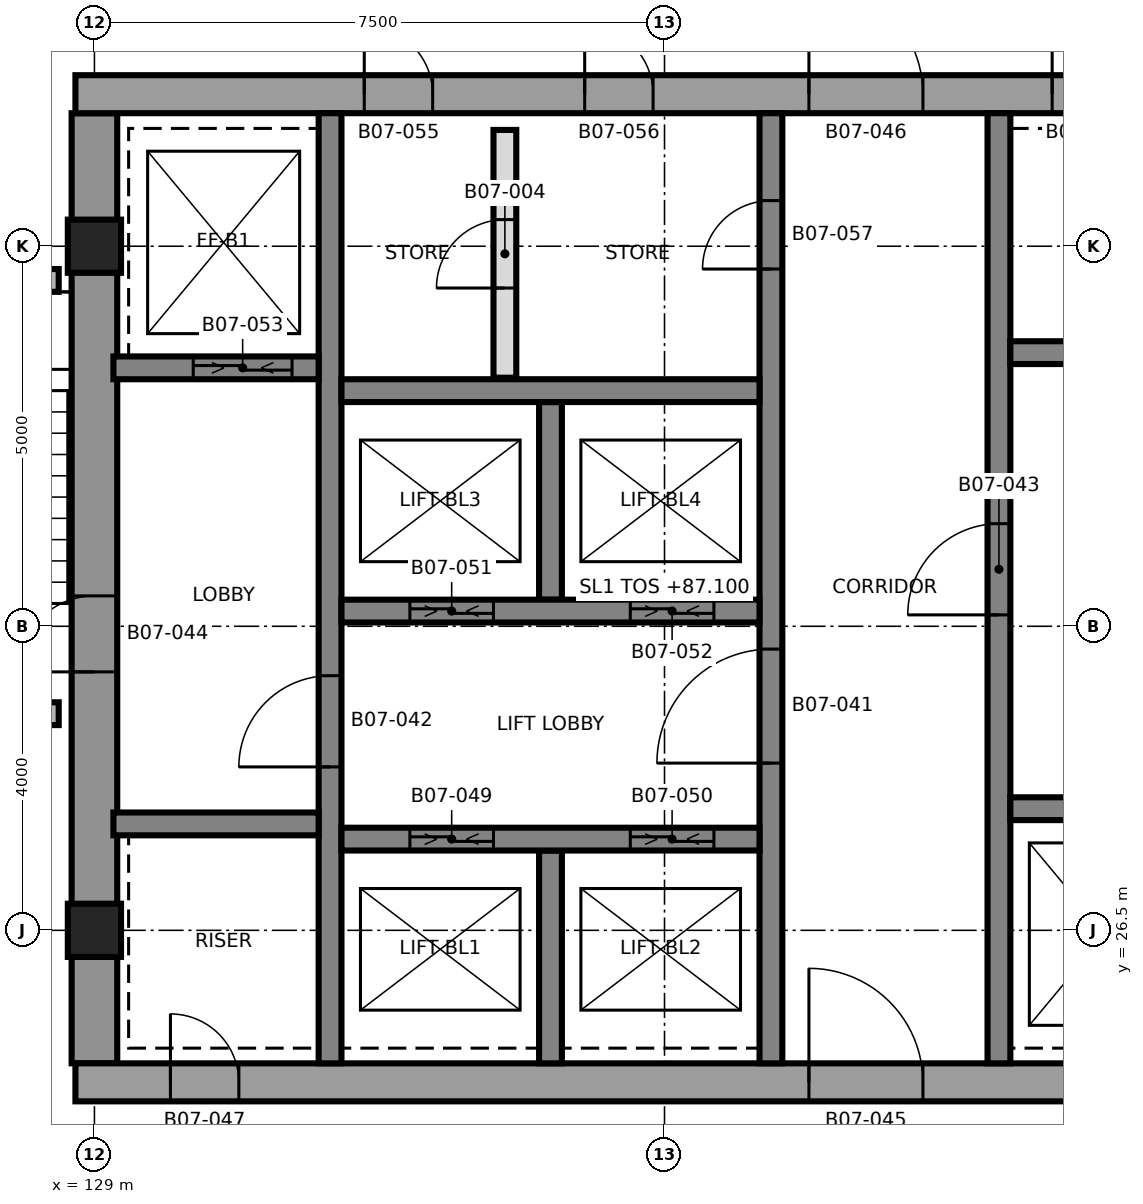
"""IFC4 building model, lengths in metres.
Left out: names, types, materials, properties, quantities, classifications, styles, units other than length and angle.
Written with IfcOpenShell. Run it as: python <this file> out.ifc"""

import sys

from ifc_helpers import new_model, si_unit, direction, frame, frame_2d, origin, origin_2d, place, context, subcontext, project, spatial, rectangle, extrude, element, fill, save


model = new_model("IFC4")
c1 = context("Model", 3, precision=1e-05, world=origin(), true_north=direction((0.0, 1.0)))
c2 = subcontext(c1, "Body", "Model", "MODEL_VIEW")
j1 = project(units=[si_unit("LENGTHUNIT", "METRE"), si_unit("PLANEANGLEUNIT", "RADIAN")], contexts=[c1])
p1 = place(None, origin())
s1 = spatial("IfcSite", under=j1, at=p1, CompositionType="ELEMENT")
p2 = place(p1, origin())
s2 = spatial("IfcBuilding", under=s1, at=p2, CompositionType="ELEMENT")
p3 = place(p2, frame((0.0, 0.0, 87.1)))
s3 = spatial("IfcBuildingStorey", under=s2, at=p3, CompositionType="ELEMENT", Elevation=87.1)
p4 = place(p3, frame((129.0, 24.75, 0.0), z_axis=(0.0, 0.0, 1.0), x_axis=(0.0, 1.0, 0.0)))
e1 = element("IfcWall", 1, at=p4, inside=s3, PredefinedType="SHEAR", context=c2, shape_type="SweptSolid", body=[
    extrude(rectangle(XDim=12.5, YDim=0.6, at=frame_2d((6.25, 0.0))), origin(), (0.0, 0.0, 1.0), 3.7),
])
p5 = place(p4, frame((5.15, 0.0, 0.0)))
e2 = element("IfcOpeningElement", 2, at=p5, cuts=e1, PredefinedType="OPENING", context=c2, shape_type="SweptSolid", body=[
    extrude(rectangle(XDim=1.0, YDim=2.1, at=frame_2d((0.5, 1.05))), frame((0.0, 0.31, 0.0), z_axis=(0.0, -1.0, 0.0), x_axis=(1.0, 0.0, 0.0)), (0.0, 0.0, 1.0), 0.62),
])
p6 = place(p3, frame((128.75, 24.5, 0.0), z_axis=(0.0, 0.0, 1.0), x_axis=(1.0, 0.0, 0.0)))
e3 = element("IfcWall", 3, at=p6, inside=s3, PredefinedType="SHEAR", context=c2, shape_type="SweptSolid", body=[
    extrude(rectangle(XDim=15.0, YDim=0.5, at=frame_2d((7.5, 0.0))), origin(), (0.0, 0.0, 1.0), 3.7),
])
p7 = place(p6, frame((9.65, 0.0, 0.0)))
e4 = element("IfcOpeningElement", 4, at=p7, cuts=e3, PredefinedType="OPENING", context=c2, shape_type="SweptSolid", body=[
    extrude(rectangle(XDim=1.5, YDim=2.1, at=frame_2d((0.75, 1.05))), frame((0.0, 0.26, 0.0), z_axis=(0.0, -1.0, 0.0), x_axis=(1.0, 0.0, 0.0)), (0.0, 0.0, 1.0), 0.52),
])
p8 = place(p6, frame((1.25, 0.0, 0.0)))
e5 = element("IfcOpeningElement", 5, at=p8, cuts=e3, PredefinedType="OPENING", context=c2, shape_type="SweptSolid", body=[
    extrude(rectangle(XDim=0.9, YDim=2.1, at=frame_2d((0.45, 1.05))), frame((0.0, 0.26, 0.0), z_axis=(0.0, -1.0, 0.0), x_axis=(1.0, 0.0, 0.0)), (0.0, 0.0, 1.0), 0.52),
])
p9 = place(p3, frame((128.75, 37.5, 0.0), z_axis=(0.0, 0.0, 1.0), x_axis=(1.0, 0.0, 0.0)))
e6 = element("IfcWall", 6, at=p9, inside=s3, PredefinedType="SHEAR", context=c2, shape_type="SweptSolid", body=[
    extrude(rectangle(XDim=15.0, YDim=0.5, at=frame_2d((7.5, 0.0))), origin(), (0.0, 0.0, 1.0), 3.7),
])
p10 = place(p9, frame((9.65, 0.0, 0.0)))
e7 = element("IfcOpeningElement", 7, at=p10, cuts=e6, PredefinedType="OPENING", context=c2, shape_type="SweptSolid", body=[
    extrude(rectangle(XDim=1.5, YDim=2.1, at=frame_2d((0.75, 1.05))), frame((0.0, 0.26, 0.0), z_axis=(0.0, -1.0, 0.0), x_axis=(1.0, 0.0, 0.0)), (0.0, 0.0, 1.0), 0.52),
])
p11 = place(p9, frame((12.85, 0.0, 0.0)))
e8 = element("IfcOpeningElement", 8, at=p11, cuts=e6, PredefinedType="OPENING", context=c2, shape_type="SweptSolid", body=[
    extrude(rectangle(XDim=0.9, YDim=2.1, at=frame_2d((0.45, 1.05))), frame((0.0, 0.26, 0.0), z_axis=(0.0, -1.0, 0.0), x_axis=(1.0, 0.0, 0.0)), (0.0, 0.0, 1.0), 0.52),
])
p12 = place(p9, frame((3.8, 0.0, 0.0)))
e9 = element("IfcOpeningElement", 9, at=p12, cuts=e6, PredefinedType="OPENING", context=c2, shape_type="SweptSolid", body=[
    extrude(rectangle(XDim=0.9, YDim=2.1, at=frame_2d((0.45, 1.05))), frame((0.0, 0.26, 0.0), z_axis=(0.0, -1.0, 0.0), x_axis=(1.0, 0.0, 0.0)), (0.0, 0.0, 1.0), 0.52),
])
p13 = place(p9, frame((6.7, 0.0, 0.0)))
e10 = element("IfcOpeningElement", 10, at=p13, cuts=e6, PredefinedType="OPENING", context=c2, shape_type="SweptSolid", body=[
    extrude(rectangle(XDim=0.9, YDim=2.1, at=frame_2d((0.45, 1.05))), frame((0.0, 0.26, 0.0), z_axis=(0.0, -1.0, 0.0), x_axis=(1.0, 0.0, 0.0)), (0.0, 0.0, 1.0), 0.52),
])
p14 = place(p3, frame((132.1, 24.75, 0.0), z_axis=(0.0, 0.0, 1.0), x_axis=(0.0, 1.0, 0.0)))
e11 = element("IfcWall", 11, at=p14, inside=s3, PredefinedType="SHEAR", context=c2, shape_type="SweptSolid", body=[
    extrude(rectangle(XDim=12.5, YDim=0.3, at=frame_2d((6.25, 0.0))), origin(), (0.0, 0.0, 1.0), 3.7),
])
p15 = place(p14, frame((3.9, 0.0, 0.0)))
e12 = element("IfcOpeningElement", 12, at=p15, cuts=e11, PredefinedType="OPENING", context=c2, shape_type="SweptSolid", body=[
    extrude(rectangle(XDim=1.2, YDim=2.1, at=frame_2d((0.6, 1.05))), frame((0.0, 0.16, 0.0), z_axis=(0.0, -1.0, 0.0), x_axis=(1.0, 0.0, 0.0)), (0.0, 0.0, 1.0), 0.32),
])
p16 = place(p3, frame((137.9, 24.75, 0.0), z_axis=(0.0, 0.0, 1.0), x_axis=(0.0, 1.0, 0.0)))
e13 = element("IfcWall", 13, at=p16, inside=s3, PredefinedType="SHEAR", context=c2, shape_type="SweptSolid", body=[
    extrude(rectangle(XDim=12.5, YDim=0.3, at=frame_2d((6.25, 0.0))), origin(), (0.0, 0.0, 1.0), 3.7),
])
p17 = place(p16, frame((3.95, 0.0, 0.0)))
e14 = element("IfcOpeningElement", 14, at=p17, cuts=e13, PredefinedType="OPENING", context=c2, shape_type="SweptSolid", body=[
    extrude(rectangle(XDim=1.5, YDim=2.1, at=frame_2d((0.75, 1.05))), frame((0.0, 0.16, 0.0), z_axis=(0.0, -1.0, 0.0), x_axis=(1.0, 0.0, 0.0)), (0.0, 0.0, 1.0), 0.32),
])
p18 = place(p16, frame((10.45, 0.0, 0.0)))
e15 = element("IfcOpeningElement", 15, at=p18, cuts=e13, PredefinedType="OPENING", context=c2, shape_type="SweptSolid", body=[
    extrude(rectangle(XDim=0.9, YDim=2.1, at=frame_2d((0.45, 1.05))), frame((0.0, 0.16, 0.0), z_axis=(0.0, -1.0, 0.0), x_axis=(1.0, 0.0, 0.0)), (0.0, 0.0, 1.0), 0.32),
])
p19 = place(p3, frame((140.9, 24.75, 0.0), z_axis=(0.0, 0.0, 1.0), x_axis=(0.0, 1.0, 0.0)))
e16 = element("IfcWall", 16, at=p19, inside=s3, PredefinedType="SHEAR", context=c2, shape_type="SweptSolid", body=[
    extrude(rectangle(XDim=12.5, YDim=0.3, at=frame_2d((6.25, 0.0))), origin(), (0.0, 0.0, 1.0), 3.7),
])
p20 = place(p19, frame((5.9, 0.0, 0.0)))
e17 = element("IfcOpeningElement", 17, at=p20, cuts=e16, PredefinedType="OPENING", context=c2, shape_type="SweptSolid", body=[
    extrude(rectangle(XDim=1.2, YDim=2.1, at=frame_2d((0.6, 1.05))), frame((0.0, 0.16, 0.0), z_axis=(0.0, -1.0, 0.0), x_axis=(1.0, 0.0, 0.0)), (0.0, 0.0, 1.0), 0.32),
])
p21 = place(p3, frame((135.0, 24.75, 0.0), z_axis=(0.0, 0.0, 1.0), x_axis=(0.0, 1.0, 0.0)))
e18 = element("IfcWall", 18, at=p21, inside=s3, PredefinedType="SHEAR", context=c2, shape_type="SweptSolid", body=[
    extrude(rectangle(XDim=2.8, YDim=0.3, at=frame_2d((1.4, 0.0))), origin(), (0.0, 0.0, 1.0), 3.7),
])
p22 = place(p3, frame((135.0, 30.85, 0.0), z_axis=(0.0, 0.0, 1.0), x_axis=(0.0, 1.0, 0.0)))
e19 = element("IfcWall", 19, at=p22, inside=s3, PredefinedType="SHEAR", context=c2, shape_type="SweptSolid", body=[
    extrude(rectangle(XDim=2.6, YDim=0.3, at=frame_2d((1.3, 0.0))), origin(), (0.0, 0.0, 1.0), 3.7),
])
p23 = place(p3, frame((132.25, 27.7, 0.0), z_axis=(0.0, 0.0, 1.0), x_axis=(1.0, 0.0, 0.0)))
e20 = element("IfcWall", 20, at=p23, inside=s3, PredefinedType="SHEAR", context=c2, shape_type="SweptSolid", body=[
    extrude(rectangle(XDim=5.5, YDim=0.3, at=frame_2d((2.75, 0.0))), origin(), (0.0, 0.0, 1.0), 3.7),
])
p24 = place(p23, frame((0.9, 0.0, 0.0)))
e21 = element("IfcOpeningElement", 21, at=p24, cuts=e20, PredefinedType="OPENING", context=c2, shape_type="SweptSolid", body=[
    extrude(rectangle(XDim=1.1, YDim=2.4, at=frame_2d((0.55, 1.2))), frame((0.0, 0.16, 0.0), z_axis=(0.0, -1.0, 0.0), x_axis=(1.0, 0.0, 0.0)), (0.0, 0.0, 1.0), 0.32),
])
p25 = place(p23, frame((3.8, 0.0, 0.0)))
e22 = element("IfcOpeningElement", 22, at=p25, cuts=e20, PredefinedType="OPENING", context=c2, shape_type="SweptSolid", body=[
    extrude(rectangle(XDim=1.1, YDim=2.4, at=frame_2d((0.55, 1.2))), frame((0.0, 0.16, 0.0), z_axis=(0.0, -1.0, 0.0), x_axis=(1.0, 0.0, 0.0)), (0.0, 0.0, 1.0), 0.32),
])
p26 = place(p3, frame((132.25, 30.7, 0.0), z_axis=(0.0, 0.0, 1.0), x_axis=(1.0, 0.0, 0.0)))
e23 = element("IfcWall", 23, at=p26, inside=s3, PredefinedType="SHEAR", context=c2, shape_type="SweptSolid", body=[
    extrude(rectangle(XDim=5.5, YDim=0.3, at=frame_2d((2.75, 0.0))), origin(), (0.0, 0.0, 1.0), 3.7),
])
p27 = place(p26, frame((0.9, 0.0, 0.0)))
e24 = element("IfcOpeningElement", 24, at=p27, cuts=e23, PredefinedType="OPENING", context=c2, shape_type="SweptSolid", body=[
    extrude(rectangle(XDim=1.1, YDim=2.4, at=frame_2d((0.55, 1.2))), frame((0.0, 0.16, 0.0), z_axis=(0.0, -1.0, 0.0), x_axis=(1.0, 0.0, 0.0)), (0.0, 0.0, 1.0), 0.32),
])
p28 = place(p26, frame((3.8, 0.0, 0.0)))
e25 = element("IfcOpeningElement", 25, at=p28, cuts=e23, PredefinedType="OPENING", context=c2, shape_type="SweptSolid", body=[
    extrude(rectangle(XDim=1.1, YDim=2.4, at=frame_2d((0.55, 1.2))), frame((0.0, 0.16, 0.0), z_axis=(0.0, -1.0, 0.0), x_axis=(1.0, 0.0, 0.0)), (0.0, 0.0, 1.0), 0.32),
])
p29 = place(p3, frame((132.25, 33.6, 0.0), z_axis=(0.0, 0.0, 1.0), x_axis=(1.0, 0.0, 0.0)))
e26 = element("IfcWall", 26, at=p29, inside=s3, PredefinedType="SHEAR", context=c2, shape_type="SweptSolid", body=[
    extrude(rectangle(XDim=5.5, YDim=0.3, at=frame_2d((2.75, 0.0))), origin(), (0.0, 0.0, 1.0), 3.7),
])
p30 = place(p3, frame((129.25, 27.9, 0.0), z_axis=(0.0, 0.0, 1.0), x_axis=(1.0, 0.0, 0.0)))
e27 = element("IfcWall", 27, at=p30, inside=s3, PredefinedType="SHEAR", context=c2, shape_type="SweptSolid", body=[
    extrude(rectangle(XDim=2.7, YDim=0.3, at=frame_2d((1.35, 0.0))), origin(), (0.0, 0.0, 1.0), 3.7),
])
p31 = place(p3, frame((129.25, 33.9, 0.0), z_axis=(0.0, 0.0, 1.0), x_axis=(1.0, 0.0, 0.0)))
e28 = element("IfcWall", 28, at=p31, inside=s3, PredefinedType="SHEAR", context=c2, shape_type="SweptSolid", body=[
    extrude(rectangle(XDim=2.7, YDim=0.3, at=frame_2d((1.35, 0.0))), origin(), (0.0, 0.0, 1.0), 3.7),
])
p32 = place(p31, frame((1.05, 0.0, 0.0)))
e29 = element("IfcOpeningElement", 29, at=p32, cuts=e28, PredefinedType="OPENING", context=c2, shape_type="SweptSolid", body=[
    extrude(rectangle(XDim=1.3, YDim=2.4, at=frame_2d((0.65, 1.2))), frame((0.0, 0.16, 0.0), z_axis=(0.0, -1.0, 0.0), x_axis=(1.0, 0.0, 0.0)), (0.0, 0.0, 1.0), 0.32),
])
p33 = place(p3, frame((141.05, 28.1, 0.0), z_axis=(0.0, 0.0, 1.0), x_axis=(1.0, 0.0, 0.0)))
e30 = element("IfcWall", 30, at=p33, inside=s3, PredefinedType="SHEAR", context=c2, shape_type="SweptSolid", body=[
    extrude(rectangle(XDim=2.7, YDim=0.3, at=frame_2d((1.35, 0.0))), origin(), (0.0, 0.0, 1.0), 3.7),
])
p34 = place(p33, frame((0.75, 0.0, 0.0)))
e31 = element("IfcOpeningElement", 31, at=p34, cuts=e30, PredefinedType="OPENING", context=c2, shape_type="SweptSolid", body=[
    extrude(rectangle(XDim=1.3, YDim=2.4, at=frame_2d((0.65, 1.2))), frame((0.0, 0.16, 0.0), z_axis=(0.0, -1.0, 0.0), x_axis=(1.0, 0.0, 0.0)), (0.0, 0.0, 1.0), 0.32),
])
p35 = place(p3, frame((141.05, 34.1, 0.0), z_axis=(0.0, 0.0, 1.0), x_axis=(1.0, 0.0, 0.0)))
e32 = element("IfcWall", 32, at=p35, inside=s3, PredefinedType="SHEAR", context=c2, shape_type="SweptSolid", body=[
    extrude(rectangle(XDim=2.7, YDim=0.3, at=frame_2d((1.35, 0.0))), origin(), (0.0, 0.0, 1.0), 3.7),
])
for number, where, z_axis, x_axis in (
    (33, (129.0, 26.5, 0.0), (0.0, 0.0, 1.0), (1.0, 0.0, 0.0)),
    (34, (129.0, 35.5, 0.0), (0.0, 0.0, 1.0), (1.0, 0.0, 0.0)),
):
    element("IfcColumn", number, at=place(p3, frame(where, z_axis=z_axis, x_axis=x_axis)), inside=s3, PredefinedType="COLUMN", context=c2, shape_type="SweptSolid", body=[
        extrude(rectangle(XDim=0.7, YDim=0.7, at=origin_2d()), origin(), (0.0, 0.0, 1.0), 3.7),
    ])
p36 = place(p3, frame((125.7, 29.35, 0.0), z_axis=(0.0, 0.0, 1.0), x_axis=(1.0, 0.0, 0.0)))
e35 = element("IfcWall", 35, at=p36, inside=s3, PredefinedType="SHEAR", context=c2, shape_type="SweptSolid", body=[
    extrude(rectangle(XDim=2.83, YDim=0.3, at=frame_2d((1.415, 0.0))), origin(), (0.0, 0.0, 1.0), 3.4),
])
p37 = place(p36, frame((0.975, 0.0, 0.0)))
e36 = element("IfcOpeningElement", 36, at=p37, cuts=e35, PredefinedType="OPENING", context=c2, shape_type="SweptSolid", body=[
    extrude(rectangle(XDim=1.2, YDim=2.1, at=frame_2d((0.6, 1.05))), frame((0.0, 0.16, 0.0), z_axis=(0.0, -1.0, 0.0), x_axis=(1.0, 0.0, 0.0)), (0.0, 0.0, 1.0), 0.32),
])
p38 = place(p3, frame((125.7, 35.05, 0.0), z_axis=(0.0, 0.0, 1.0), x_axis=(1.0, 0.0, 0.0)))
e37 = element("IfcWall", 37, at=p38, inside=s3, PredefinedType="SHEAR", context=c2, shape_type="SweptSolid", body=[
    extrude(rectangle(XDim=2.83, YDim=0.3, at=frame_2d((1.415, 0.0))), origin(), (0.0, 0.0, 1.0), 3.4),
])
p39 = place(p3, frame((134.4, 33.77, 0.0), z_axis=(0.0, 0.0, 1.0), x_axis=(0.0, 1.0, 0.0)))
e38 = element("IfcWall", 38, at=p39, inside=s3, PredefinedType="PARTITIONING", context=c2, shape_type="SweptSolid", body=[
    extrude(rectangle(XDim=3.26, YDim=0.3, at=frame_2d((1.63, 0.0))), origin(), (0.0, 0.0, 1.0), 3.4),
])
p40 = place(p39, frame((1.18, 0.0, 0.0)))
e39 = element("IfcOpeningElement", 39, at=p40, cuts=e38, PredefinedType="OPENING", context=c2, shape_type="SweptSolid", body=[
    extrude(rectangle(XDim=0.9, YDim=2.1, at=frame_2d((0.45, 1.05))), frame((0.0, 0.16, 0.0), z_axis=(0.0, -1.0, 0.0), x_axis=(1.0, 0.0, 0.0)), (0.0, 0.0, 1.0), 0.32),
])
p41 = place(p40, origin())
e40 = element("IfcDoor", 40, at=p41, inside=s3, OperationType="SINGLE_SWING_RIGHT", PredefinedType="DOOR", context=c2, shape_type="SweptSolid", body=[
    extrude(rectangle(XDim=0.9, YDim=2.1, at=frame_2d((0.45, 1.05))), frame((0.0, 0.025, 0.0), z_axis=(0.0, -1.0, 0.0), x_axis=(1.0, 0.0, 0.0)), (0.0, 0.0, 1.0), 0.05),
])
fill(e39, e40)
p42 = place(p17, origin())
e41 = element("IfcDoor", 41, at=p42, inside=s3, OperationType="SINGLE_SWING_RIGHT", PredefinedType="DOOR", context=c2, shape_type="SweptSolid", body=[
    extrude(rectangle(XDim=1.5, YDim=2.1, at=frame_2d((0.75, 1.05))), frame((0.0, 0.025, 0.0), z_axis=(0.0, -1.0, 0.0), x_axis=(1.0, 0.0, 0.0)), (0.0, 0.0, 1.0), 0.05),
])
fill(e14, e41)
p43 = place(p15, origin())
e42 = element("IfcDoor", 42, at=p43, inside=s3, OperationType="SINGLE_SWING_LEFT", PredefinedType="DOOR", context=c2, shape_type="SweptSolid", body=[
    extrude(rectangle(XDim=1.2, YDim=2.1, at=frame_2d((0.6, 1.05))), frame((0.0, 0.025, 0.0), z_axis=(0.0, -1.0, 0.0), x_axis=(1.0, 0.0, 0.0)), (0.0, 0.0, 1.0), 0.05),
])
fill(e12, e42)
p44 = place(p20, origin())
e43 = element("IfcDoor", 43, at=p44, inside=s3, OperationType="SINGLE_SWING_RIGHT", PredefinedType="DOOR", context=c2, shape_type="SweptSolid", body=[
    extrude(rectangle(XDim=1.2, YDim=2.1, at=frame_2d((0.6, 1.05))), frame((0.0, 0.025, 0.0), z_axis=(0.0, -1.0, 0.0), x_axis=(1.0, 0.0, 0.0)), (0.0, 0.0, 1.0), 0.05),
])
fill(e17, e43)
p45 = place(p5, origin())
e44 = element("IfcDoor", 44, at=p45, inside=s3, OperationType="SINGLE_SWING_RIGHT", PredefinedType="DOOR", context=c2, shape_type="SweptSolid", body=[
    extrude(rectangle(XDim=1.0, YDim=2.1, at=frame_2d((0.5, 1.05))), frame((0.0, 0.025, 0.0), z_axis=(0.0, -1.0, 0.0), x_axis=(1.0, 0.0, 0.0)), (0.0, 0.0, 1.0), 0.05),
])
fill(e2, e44)
p46 = place(p7, origin())
e45 = element("IfcDoor", 45, at=p46, inside=s3, OperationType="SINGLE_SWING_LEFT", PredefinedType="DOOR", context=c2, shape_type="SweptSolid", body=[
    extrude(rectangle(XDim=1.5, YDim=2.1, at=frame_2d((0.75, 1.05))), frame((0.0, 0.025, 0.0), z_axis=(0.0, -1.0, 0.0), x_axis=(1.0, 0.0, 0.0)), (0.0, 0.0, 1.0), 0.05),
])
fill(e4, e45)
p47 = place(p10, origin())
e46 = element("IfcDoor", 46, at=p47, inside=s3, OperationType="SINGLE_SWING_RIGHT", PredefinedType="DOOR", context=c2, shape_type="SweptSolid", body=[
    extrude(rectangle(XDim=1.5, YDim=2.1, at=frame_2d((0.75, 1.05))), frame((0.0, 0.025, 0.0), z_axis=(0.0, -1.0, 0.0), x_axis=(1.0, 0.0, 0.0)), (0.0, 0.0, 1.0), 0.05),
])
fill(e7, e46)
p48 = place(p8, origin())
e47 = element("IfcDoor", 47, at=p48, inside=s3, OperationType="SINGLE_SWING_LEFT", PredefinedType="DOOR", context=c2, shape_type="SweptSolid", body=[
    extrude(rectangle(XDim=0.9, YDim=2.1, at=frame_2d((0.45, 1.05))), frame((0.0, 0.025, 0.0), z_axis=(0.0, -1.0, 0.0), x_axis=(1.0, 0.0, 0.0)), (0.0, 0.0, 1.0), 0.05),
])
fill(e5, e47)
p49 = place(p11, origin())
e48 = element("IfcDoor", 48, at=p49, inside=s3, OperationType="SINGLE_SWING_RIGHT", PredefinedType="DOOR", context=c2, shape_type="SweptSolid", body=[
    extrude(rectangle(XDim=0.9, YDim=2.1, at=frame_2d((0.45, 1.05))), frame((0.0, 0.025, 0.0), z_axis=(0.0, -1.0, 0.0), x_axis=(1.0, 0.0, 0.0)), (0.0, 0.0, 1.0), 0.05),
])
fill(e8, e48)
p50 = place(p24, origin())
e49 = element("IfcDoor", 49, at=p50, inside=s3, OperationType="SLIDING_TO_LEFT", PredefinedType="DOOR", context=c2, shape_type="SweptSolid", body=[
    extrude(rectangle(XDim=1.1, YDim=2.4, at=frame_2d((0.55, 1.2))), frame((0.0, 0.025, 0.0), z_axis=(0.0, -1.0, 0.0), x_axis=(1.0, 0.0, 0.0)), (0.0, 0.0, 1.0), 0.05),
])
fill(e21, e49)
p51 = place(p25, origin())
e50 = element("IfcDoor", 50, at=p51, inside=s3, OperationType="SLIDING_TO_LEFT", PredefinedType="DOOR", context=c2, shape_type="SweptSolid", body=[
    extrude(rectangle(XDim=1.1, YDim=2.4, at=frame_2d((0.55, 1.2))), frame((0.0, 0.025, 0.0), z_axis=(0.0, -1.0, 0.0), x_axis=(1.0, 0.0, 0.0)), (0.0, 0.0, 1.0), 0.05),
])
fill(e22, e50)
p52 = place(p27, origin())
e51 = element("IfcDoor", 51, at=p52, inside=s3, OperationType="SLIDING_TO_LEFT", PredefinedType="DOOR", context=c2, shape_type="SweptSolid", body=[
    extrude(rectangle(XDim=1.1, YDim=2.4, at=frame_2d((0.55, 1.2))), frame((0.0, 0.025, 0.0), z_axis=(0.0, -1.0, 0.0), x_axis=(1.0, 0.0, 0.0)), (0.0, 0.0, 1.0), 0.05),
])
fill(e24, e51)
p53 = place(p28, origin())
e52 = element("IfcDoor", 52, at=p53, inside=s3, OperationType="SLIDING_TO_LEFT", PredefinedType="DOOR", context=c2, shape_type="SweptSolid", body=[
    extrude(rectangle(XDim=1.1, YDim=2.4, at=frame_2d((0.55, 1.2))), frame((0.0, 0.025, 0.0), z_axis=(0.0, -1.0, 0.0), x_axis=(1.0, 0.0, 0.0)), (0.0, 0.0, 1.0), 0.05),
])
fill(e25, e52)
p54 = place(p32, origin())
e53 = element("IfcDoor", 53, at=p54, inside=s3, OperationType="SLIDING_TO_LEFT", PredefinedType="DOOR", context=c2, shape_type="SweptSolid", body=[
    extrude(rectangle(XDim=1.3, YDim=2.4, at=frame_2d((0.65, 1.2))), frame((0.0, 0.025, 0.0), z_axis=(0.0, -1.0, 0.0), x_axis=(1.0, 0.0, 0.0)), (0.0, 0.0, 1.0), 0.05),
])
fill(e29, e53)
p55 = place(p12, origin())
e54 = element("IfcDoor", 54, at=p55, inside=s3, OperationType="SINGLE_SWING_LEFT", PredefinedType="DOOR", context=c2, shape_type="SweptSolid", body=[
    extrude(rectangle(XDim=0.9, YDim=2.1, at=frame_2d((0.45, 1.05))), frame((0.0, 0.025, 0.0), z_axis=(0.0, -1.0, 0.0), x_axis=(1.0, 0.0, 0.0)), (0.0, 0.0, 1.0), 0.05),
])
fill(e9, e54)
p56 = place(p13, origin())
e55 = element("IfcDoor", 55, at=p56, inside=s3, OperationType="SINGLE_SWING_RIGHT", PredefinedType="DOOR", context=c2, shape_type="SweptSolid", body=[
    extrude(rectangle(XDim=0.9, YDim=2.1, at=frame_2d((0.45, 1.05))), frame((0.0, 0.025, 0.0), z_axis=(0.0, -1.0, 0.0), x_axis=(1.0, 0.0, 0.0)), (0.0, 0.0, 1.0), 0.05),
])
fill(e10, e55)
p57 = place(p18, origin())
e56 = element("IfcDoor", 56, at=p57, inside=s3, OperationType="SINGLE_SWING_RIGHT", PredefinedType="DOOR", context=c2, shape_type="SweptSolid", body=[
    extrude(rectangle(XDim=0.9, YDim=2.1, at=frame_2d((0.45, 1.05))), frame((0.0, 0.025, 0.0), z_axis=(0.0, -1.0, 0.0), x_axis=(1.0, 0.0, 0.0)), (0.0, 0.0, 1.0), 0.05),
])
fill(e15, e56)
save(model, sys.argv[1])
